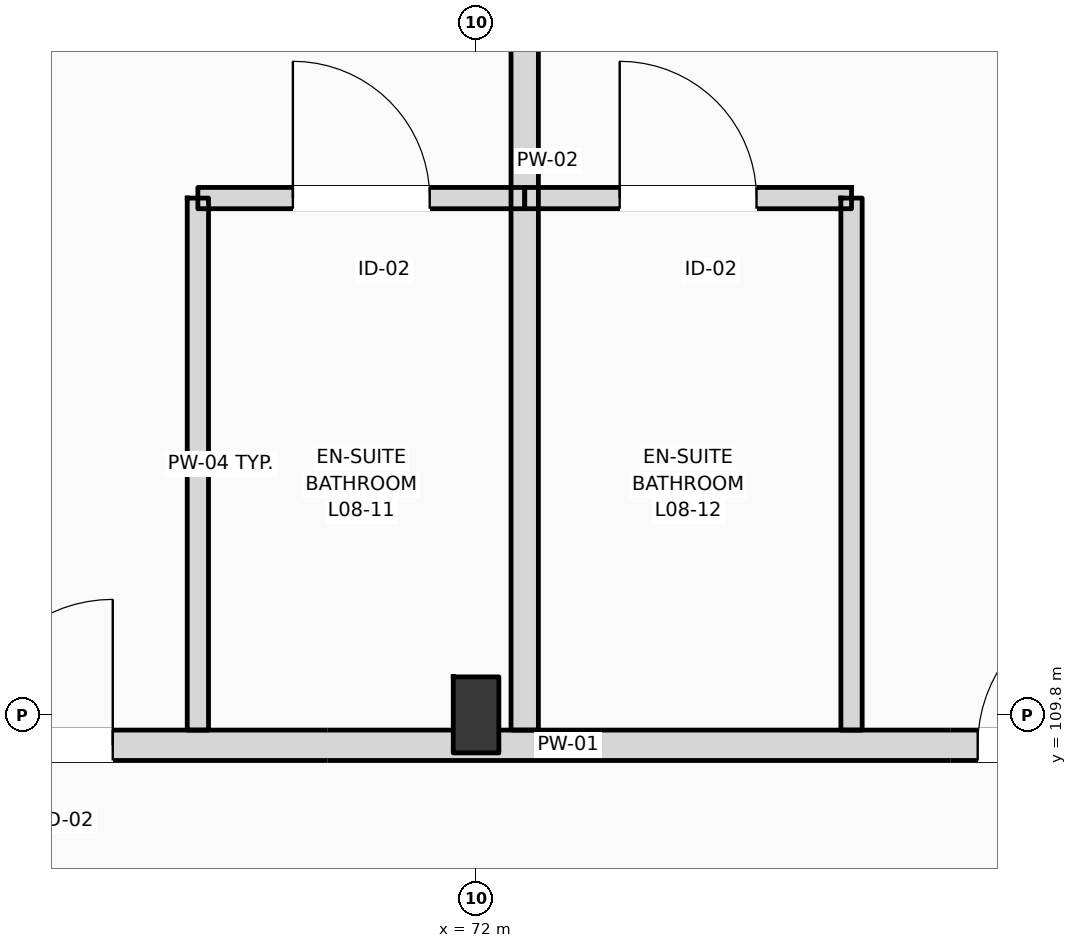
"""IFC4 building model, lengths in metres.
Left out: names, types, materials, properties, quantities, classifications, styles, units other than length and angle.
Written with IfcOpenShell. Run it as: python <this file> out.ifc"""

import sys

from ifc_helpers import new_model, si_unit, direction, frame, frame_2d, origin, origin_2d, place, context, subcontext, project, spatial, rectangle, i_section, extrude, element, fill, save


model = new_model("IFC4")
c1 = context("Model", 3, precision=1e-05, world=origin(), true_north=direction((0.0, 1.0)))
c2 = subcontext(c1, "Body", "Model", "MODEL_VIEW")
j1 = project(units=[si_unit("LENGTHUNIT", "METRE"), si_unit("PLANEANGLEUNIT", "RADIAN")], contexts=[c1])
p1 = place(None, origin())
s1 = spatial("IfcSite", under=j1, at=p1, CompositionType="ELEMENT")
p2 = place(p1, origin())
s2 = spatial("IfcBuilding", under=s1, at=p2, CompositionType="ELEMENT")
p3 = place(p2, frame((0.0, 0.0, 35.4)))
s3 = spatial("IfcBuildingStorey", under=s2, at=p3, CompositionType="ELEMENT", Elevation=35.4)
p4 = place(p3, frame((72.0, 109.8, 0.0), z_axis=(0.0, 0.0, 1.0), x_axis=(1.0, 0.0, 0.0)))
e1 = element("IfcColumn", 1, at=p4, inside=s3, PredefinedType="COLUMN", context=c2, shape_type="SweptSolid", body=[
    extrude(i_section(OverallWidth=0.3, OverallDepth=0.5, WebThickness=0.014, FlangeThickness=0.028, FilletRadius=0.027, at=origin_2d()), origin(), (0.0, 0.0, 1.0), 3.6),
])
p5 = place(p3, frame((10.65, 109.6, 0.0), z_axis=(0.0, 0.0, 1.0), x_axis=(1.0, 0.0, 0.0)))
e2 = element("IfcWall", 2, at=p5, inside=s3, PredefinedType="PARTITIONING", context=c2, shape_type="SweptSolid", body=[
    extrude(rectangle(XDim=84.61, YDim=0.2, at=frame_2d((42.305, 0.0))), origin(), (0.0, 0.0, 1.0), 2.82),
])
p6 = place(p5, frame((12.675, 0.0, 0.0)))
e3 = element("IfcOpeningElement", 3, at=p6, cuts=e2, PredefinedType="OPENING", context=c2, shape_type="SweptSolid", body=[
    extrude(rectangle(XDim=1.02, YDim=2.2, at=frame_2d((0.51, 1.1))), frame((0.0, 0.11, 0.0), z_axis=(0.0, -1.0, 0.0), x_axis=(1.0, 0.0, 0.0)), (0.0, 0.0, 1.0), 0.22),
])
p7 = place(p5, frame((19.62, 0.0, 0.0)))
e4 = element("IfcOpeningElement", 4, at=p7, cuts=e2, PredefinedType="OPENING", context=c2, shape_type="SweptSolid", body=[
    extrude(rectangle(XDim=1.02, YDim=2.2, at=frame_2d((0.51, 1.1))), frame((0.0, 0.11, 0.0), z_axis=(0.0, -1.0, 0.0), x_axis=(1.0, 0.0, 0.0)), (0.0, 0.0, 1.0), 0.22),
])
p8 = place(p5, frame((24.12, 0.0, 0.0)))
e5 = element("IfcOpeningElement", 5, at=p8, cuts=e2, PredefinedType="OPENING", context=c2, shape_type="SweptSolid", body=[
    extrude(rectangle(XDim=1.02, YDim=2.2, at=frame_2d((0.51, 1.1))), frame((0.0, 0.11, 0.0), z_axis=(0.0, -1.0, 0.0), x_axis=(1.0, 0.0, 0.0)), (0.0, 0.0, 1.0), 0.22),
])
p9 = place(p5, frame((26.47, 0.0, 0.0)))
e6 = element("IfcOpeningElement", 6, at=p9, cuts=e2, PredefinedType="OPENING", context=c2, shape_type="SweptSolid", body=[
    extrude(rectangle(XDim=1.02, YDim=2.2, at=frame_2d((0.51, 1.1))), frame((0.0, 0.11, 0.0), z_axis=(0.0, -1.0, 0.0), x_axis=(1.0, 0.0, 0.0)), (0.0, 0.0, 1.0), 0.22),
])
p10 = place(p5, frame((33.15, 0.0, 0.0)))
e7 = element("IfcOpeningElement", 7, at=p10, cuts=e2, PredefinedType="OPENING", context=c2, shape_type="SweptSolid", body=[
    extrude(rectangle(XDim=0.96, YDim=2.2, at=frame_2d((0.48, 1.1))), frame((0.0, 0.11, 0.0), z_axis=(0.0, -1.0, 0.0), x_axis=(1.0, 0.0, 0.0)), (0.0, 0.0, 1.0), 0.22),
])
p11 = place(p5, frame((35.5, 0.0, 0.0)))
e8 = element("IfcOpeningElement", 8, at=p11, cuts=e2, PredefinedType="OPENING", context=c2, shape_type="SweptSolid", body=[
    extrude(rectangle(XDim=0.96, YDim=2.2, at=frame_2d((0.48, 1.1))), frame((0.0, 0.11, 0.0), z_axis=(0.0, -1.0, 0.0), x_axis=(1.0, 0.0, 0.0)), (0.0, 0.0, 1.0), 0.22),
])
p12 = place(p5, frame((42.15, 0.0, 0.0)))
e9 = element("IfcOpeningElement", 9, at=p12, cuts=e2, PredefinedType="OPENING", context=c2, shape_type="SweptSolid", body=[
    extrude(rectangle(XDim=0.96, YDim=2.2, at=frame_2d((0.48, 1.1))), frame((0.0, 0.11, 0.0), z_axis=(0.0, -1.0, 0.0), x_axis=(1.0, 0.0, 0.0)), (0.0, 0.0, 1.0), 0.22),
])
p13 = place(p5, frame((47.15, 0.0, 0.0)))
e10 = element("IfcOpeningElement", 10, at=p13, cuts=e2, PredefinedType="OPENING", context=c2, shape_type="SweptSolid", body=[
    extrude(rectangle(XDim=0.96, YDim=2.2, at=frame_2d((0.48, 1.1))), frame((0.0, 0.11, 0.0), z_axis=(0.0, -1.0, 0.0), x_axis=(1.0, 0.0, 0.0)), (0.0, 0.0, 1.0), 0.22),
])
p14 = place(p5, frame((51.15, 0.0, 0.0)))
e11 = element("IfcOpeningElement", 11, at=p14, cuts=e2, PredefinedType="OPENING", context=c2, shape_type="SweptSolid", body=[
    extrude(rectangle(XDim=0.96, YDim=2.2, at=frame_2d((0.48, 1.1))), frame((0.0, 0.11, 0.0), z_axis=(0.0, -1.0, 0.0), x_axis=(1.0, 0.0, 0.0)), (0.0, 0.0, 1.0), 0.22),
])
p15 = place(p5, frame((55.65, 0.0, 0.0)))
e12 = element("IfcOpeningElement", 12, at=p15, cuts=e2, PredefinedType="OPENING", context=c2, shape_type="SweptSolid", body=[
    extrude(rectangle(XDim=0.96, YDim=2.2, at=frame_2d((0.48, 1.1))), frame((0.0, 0.11, 0.0), z_axis=(0.0, -1.0, 0.0), x_axis=(1.0, 0.0, 0.0)), (0.0, 0.0, 1.0), 0.22),
])
p16 = place(p5, frame((58.0, 0.0, 0.0)))
e13 = element("IfcOpeningElement", 13, at=p16, cuts=e2, PredefinedType="OPENING", context=c2, shape_type="SweptSolid", body=[
    extrude(rectangle(XDim=0.96, YDim=2.2, at=frame_2d((0.48, 1.1))), frame((0.0, 0.11, 0.0), z_axis=(0.0, -1.0, 0.0), x_axis=(1.0, 0.0, 0.0)), (0.0, 0.0, 1.0), 0.22),
])
p17 = place(p5, frame((64.65, 0.0, 0.0)))
e14 = element("IfcOpeningElement", 14, at=p17, cuts=e2, PredefinedType="OPENING", context=c2, shape_type="SweptSolid", body=[
    extrude(rectangle(XDim=0.96, YDim=2.2, at=frame_2d((0.48, 1.1))), frame((0.0, 0.11, 0.0), z_axis=(0.0, -1.0, 0.0), x_axis=(1.0, 0.0, 0.0)), (0.0, 0.0, 1.0), 0.22),
])
p18 = place(p5, frame((66.75, 0.0, 0.0)))
e15 = element("IfcOpeningElement", 15, at=p18, cuts=e2, PredefinedType="OPENING", context=c2, shape_type="SweptSolid", body=[
    extrude(rectangle(XDim=0.96, YDim=2.2, at=frame_2d((0.48, 1.1))), frame((0.0, 0.11, 0.0), z_axis=(0.0, -1.0, 0.0), x_axis=(1.0, 0.0, 0.0)), (0.0, 0.0, 1.0), 0.22),
])
p19 = place(p5, frame((73.65, 0.0, 0.0)))
e16 = element("IfcOpeningElement", 16, at=p19, cuts=e2, PredefinedType="OPENING", context=c2, shape_type="SweptSolid", body=[
    extrude(rectangle(XDim=0.96, YDim=2.2, at=frame_2d((0.48, 1.1))), frame((0.0, 0.11, 0.0), z_axis=(0.0, -1.0, 0.0), x_axis=(1.0, 0.0, 0.0)), (0.0, 0.0, 1.0), 0.22),
])
p20 = place(p5, frame((78.4, 0.0, 0.0)))
e17 = element("IfcOpeningElement", 17, at=p20, cuts=e2, PredefinedType="OPENING", context=c2, shape_type="SweptSolid", body=[
    extrude(rectangle(XDim=0.96, YDim=2.2, at=frame_2d((0.48, 1.1))), frame((0.0, 0.11, 0.0), z_axis=(0.0, -1.0, 0.0), x_axis=(1.0, 0.0, 0.0)), (0.0, 0.0, 1.0), 0.22),
])
p21 = place(p5, frame((80.455, 0.0, 0.0)))
e18 = element("IfcOpeningElement", 18, at=p21, cuts=e2, PredefinedType="OPENING", context=c2, shape_type="SweptSolid", body=[
    extrude(rectangle(XDim=0.96, YDim=2.2, at=frame_2d((0.48, 1.1))), frame((0.0, 0.11, 0.0), z_axis=(0.0, -1.0, 0.0), x_axis=(1.0, 0.0, 0.0)), (0.0, 0.0, 1.0), 0.22),
])
p22 = place(p5, frame((2.716, 0.0, 0.0)))
e19 = element("IfcOpeningElement", 19, at=p22, cuts=e2, PredefinedType="OPENING", context=c2, shape_type="SweptSolid", body=[
    extrude(rectangle(XDim=1.35, YDim=2.25, at=frame_2d((0.675, 1.125))), frame((0.0, 0.11, 0.0), z_axis=(0.0, -1.0, 0.0), x_axis=(1.0, 0.0, 0.0)), (0.0, 0.0, 1.0), 0.22),
])
p23 = place(p5, frame((6.65, 0.0, 0.0)))
e20 = element("IfcOpeningElement", 20, at=p23, cuts=e2, PredefinedType="OPENING", context=c2, shape_type="SweptSolid", body=[
    extrude(rectangle(XDim=1.35, YDim=2.25, at=frame_2d((0.675, 1.125))), frame((0.0, 0.11, 0.0), z_axis=(0.0, -1.0, 0.0), x_axis=(1.0, 0.0, 0.0)), (0.0, 0.0, 1.0), 0.22),
])
p24 = place(p5, frame((10.583, 0.0, 0.0)))
e21 = element("IfcOpeningElement", 21, at=p24, cuts=e2, PredefinedType="OPENING", context=c2, shape_type="SweptSolid", body=[
    extrude(rectangle(XDim=1.35, YDim=2.25, at=frame_2d((0.675, 1.125))), frame((0.0, 0.11, 0.0), z_axis=(0.0, -1.0, 0.0), x_axis=(1.0, 0.0, 0.0)), (0.0, 0.0, 1.0), 0.22),
])
p25 = place(p3, frame((72.32, 109.7, 0.0), z_axis=(0.0, 0.0, 1.0), x_axis=(0.0, 1.0, 0.0)))
e22 = element("IfcWall", 22, at=p25, inside=s3, PredefinedType="PARTITIONING", context=c2, shape_type="SweptSolid", body=[
    extrude(rectangle(XDim=8.15, YDim=0.18, at=frame_2d((4.075, 0.0))), origin(), (0.0, 0.0, 1.0), 3.38),
])
p26 = place(p3, frame((70.17, 109.7, 0.0), z_axis=(0.0, 0.0, 1.0), x_axis=(0.0, 1.0, 0.0)))
e23 = element("IfcWall", 23, at=p26, inside=s3, PredefinedType="PARTITIONING", context=c2, shape_type="SweptSolid", body=[
    extrude(rectangle(XDim=3.5, YDim=0.14, at=frame_2d((1.75, 0.0))), origin(), (0.0, 0.0, 1.0), 3.38),
])
p27 = place(p3, frame((70.17, 113.2, 0.0), z_axis=(0.0, 0.0, 1.0), x_axis=(1.0, 0.0, 0.0)))
e24 = element("IfcWall", 24, at=p27, inside=s3, PredefinedType="PARTITIONING", context=c2, shape_type="SweptSolid", body=[
    extrude(rectangle(XDim=2.15, YDim=0.14, at=frame_2d((1.075, 0.0))), origin(), (0.0, 0.0, 1.0), 3.38),
])
p28 = place(p27, frame((0.625, 0.0, 0.0)))
e25 = element("IfcOpeningElement", 25, at=p28, cuts=e24, PredefinedType="OPENING", context=c2, shape_type="SweptSolid", body=[
    extrude(rectangle(XDim=0.9, YDim=2.1, at=frame_2d((0.45, 1.05))), frame((0.0, 0.08, 0.0), z_axis=(0.0, -1.0, 0.0), x_axis=(1.0, 0.0, 0.0)), (0.0, 0.0, 1.0), 0.16),
])
p29 = place(p3, frame((74.47, 109.7, 0.0), z_axis=(0.0, 0.0, 1.0), x_axis=(0.0, 1.0, 0.0)))
e26 = element("IfcWall", 26, at=p29, inside=s3, PredefinedType="PARTITIONING", context=c2, shape_type="SweptSolid", body=[
    extrude(rectangle(XDim=3.5, YDim=0.14, at=frame_2d((1.75, 0.0))), origin(), (0.0, 0.0, 1.0), 3.07),
])
p30 = place(p3, frame((72.32, 113.2, 0.0), z_axis=(0.0, 0.0, 1.0), x_axis=(1.0, 0.0, 0.0)))
e27 = element("IfcWall", 27, at=p30, inside=s3, PredefinedType="PARTITIONING", context=c2, shape_type="SweptSolid", body=[
    extrude(rectangle(XDim=2.15, YDim=0.14, at=frame_2d((1.075, 0.0))), origin(), (0.0, 0.0, 1.0), 3.38),
])
p31 = place(p30, frame((0.625, 0.0, 0.0)))
e28 = element("IfcOpeningElement", 28, at=p31, cuts=e27, PredefinedType="OPENING", context=c2, shape_type="SweptSolid", body=[
    extrude(rectangle(XDim=0.9, YDim=2.1, at=frame_2d((0.45, 1.05))), frame((0.0, 0.08, 0.0), z_axis=(0.0, -1.0, 0.0), x_axis=(1.0, 0.0, 0.0)), (0.0, 0.0, 1.0), 0.16),
])
p32 = place(p16, origin())
e29 = element("IfcDoor", 29, at=p32, inside=s3, OperationType="SINGLE_SWING_RIGHT", PredefinedType="DOOR", context=c2, shape_type="SweptSolid", body=[
    extrude(rectangle(XDim=0.96, YDim=2.2, at=frame_2d((0.48, 1.1))), frame((0.0, 0.025, 0.0), z_axis=(0.0, -1.0, 0.0), x_axis=(1.0, 0.0, 0.0)), (0.0, 0.0, 1.0), 0.05),
])
fill(e13, e29)
p33 = place(p28, origin())
e30 = element("IfcDoor", 30, at=p33, inside=s3, OperationType="SINGLE_SWING_LEFT", PredefinedType="DOOR", context=c2, shape_type="SweptSolid", body=[
    extrude(rectangle(XDim=0.9, YDim=2.1, at=frame_2d((0.45, 1.05))), frame((0.0, 0.025, 0.0), z_axis=(0.0, -1.0, 0.0), x_axis=(1.0, 0.0, 0.0)), (0.0, 0.0, 1.0), 0.05),
])
fill(e25, e30)
p34 = place(p17, origin())
e31 = element("IfcDoor", 31, at=p34, inside=s3, OperationType="SINGLE_SWING_RIGHT", PredefinedType="DOOR", context=c2, shape_type="SweptSolid", body=[
    extrude(rectangle(XDim=0.96, YDim=2.2, at=frame_2d((0.48, 1.1))), frame((0.0, 0.025, 0.0), z_axis=(0.0, -1.0, 0.0), x_axis=(1.0, 0.0, 0.0)), (0.0, 0.0, 1.0), 0.05),
])
fill(e14, e31)
p35 = place(p31, origin())
e32 = element("IfcDoor", 32, at=p35, inside=s3, OperationType="SINGLE_SWING_LEFT", PredefinedType="DOOR", context=c2, shape_type="SweptSolid", body=[
    extrude(rectangle(XDim=0.9, YDim=2.1, at=frame_2d((0.45, 1.05))), frame((0.0, 0.025, 0.0), z_axis=(0.0, -1.0, 0.0), x_axis=(1.0, 0.0, 0.0)), (0.0, 0.0, 1.0), 0.05),
])
fill(e28, e32)
save(model, sys.argv[1])
